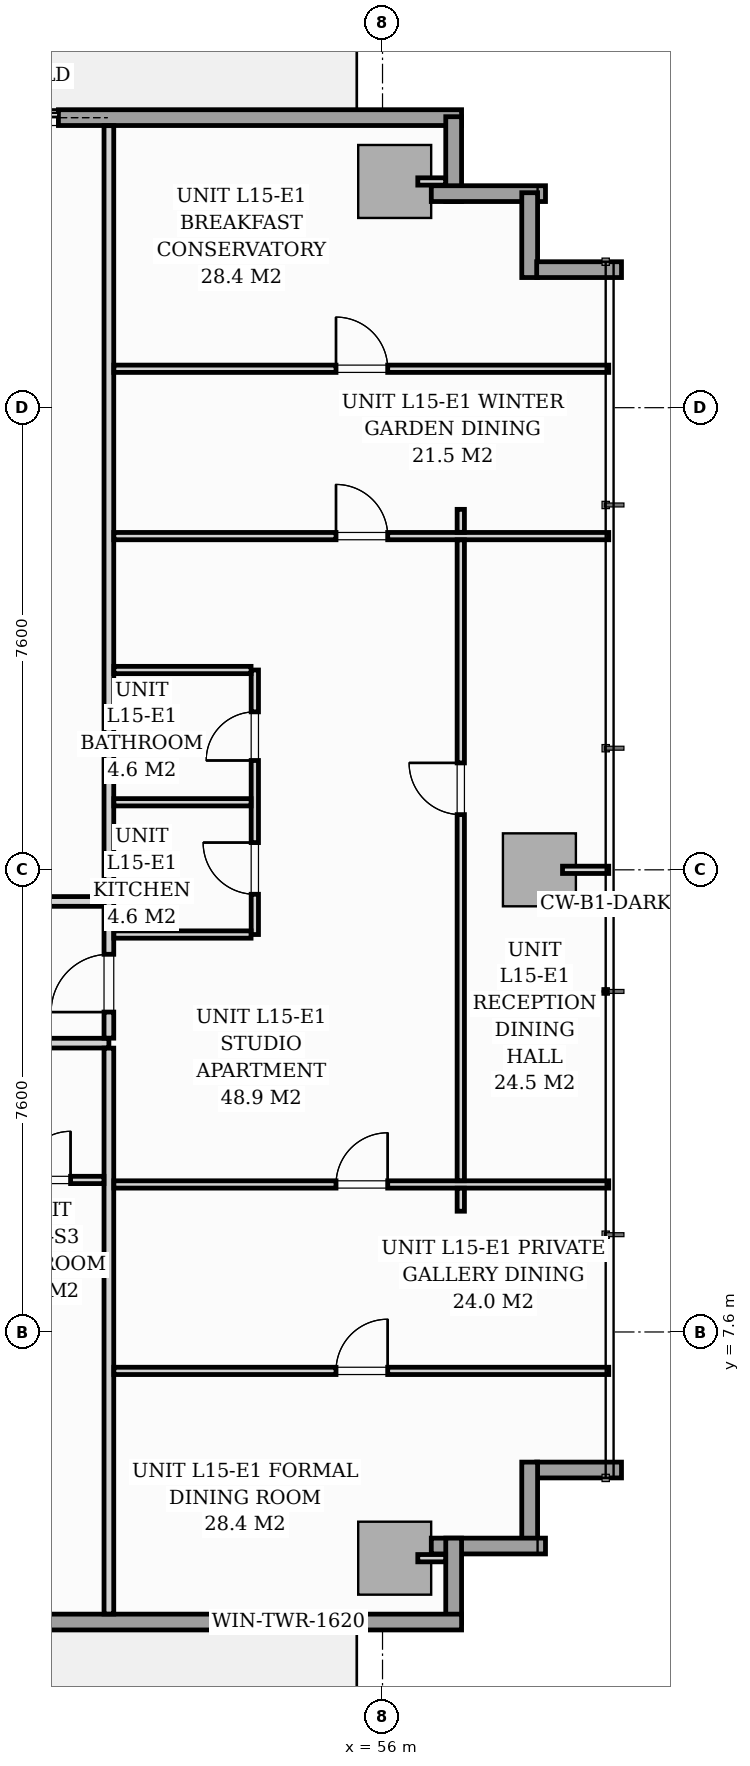
"""IFC4 building model, lengths in metres.
Left out: names, types, materials, properties, quantities, classifications, styles, units other than length and angle.
Written with IfcOpenShell. Run it as: python <this file> out.ifc"""

import sys

from ifc_helpers import new_model, si_unit, direction, frame, frame_2d, origin, origin_2d, place, context, subcontext, project, spatial, rectangle, extrude, source, transform, mapped, element, fill, save


model = new_model("IFC4")
c1 = context("Model", 3, precision=1e-05, world=origin(), true_north=direction((0.0, 1.0)))
c2 = subcontext(c1, "Body", "Model", "MODEL_VIEW")
j1 = project(units=[si_unit("LENGTHUNIT", "METRE"), si_unit("PLANEANGLEUNIT", "RADIAN")], contexts=[c1])
p1 = place(None, origin())
s1 = spatial("IfcSite", under=j1, at=p1, CompositionType="ELEMENT")
p2 = place(p1, origin())
s2 = spatial("IfcBuilding", under=s1, at=p2, CompositionType="ELEMENT")
p3 = place(p2, frame((0.0, 0.0, 55.0)))
s3 = spatial("IfcBuildingStorey", under=s2, at=p3, CompositionType="ELEMENT", Elevation=55.0)
m1 = source(origin(), c2, "Body", "SweptSolid", [
    extrude(rectangle(XDim=1.2, YDim=1.2, at=origin_2d()), origin(), (0.0, 0.0, 1.0), 3.196),
])
for number, where, z_axis, x_axis in (
    (1, (56.2, 3.88, 0.002), (0.0, 0.0, 1.0), (1.0, 0.0, 0.0)),
    (2, (56.2, 26.52, 0.002), (0.0, 0.0, 1.0), (1.0, 0.0, 0.0)),
    (3, (58.58, 15.2, 0.002), (0.0, 0.0, 1.0), (1.0, 0.0, 0.0)),
):
    element("IfcColumn", number, at=place(p3, frame(where, z_axis=z_axis, x_axis=x_axis)), inside=s3, PredefinedType="COLUMN", context=c2, shape_type="MappedRepresentation", body=[
        mapped(m1, transform((0.0, 0.0, 0.0), scale=1.0)),
    ])
p4 = place(p3, frame((40.15, 27.57, 0.0), z_axis=(0.0, 0.0, 1.0), x_axis=(1.0, 0.0, 0.0)))
e4 = element("IfcWall", 4, at=p4, inside=s3, PredefinedType="STANDARD", context=c2, shape_type="SweptSolid", body=[
    extrude(rectangle(XDim=17.15, YDim=0.26, at=frame_2d((8.575, 0.0))), origin(), (0.0, 0.0, 1.0), 2.94),
])
p5 = place(p4, frame((8.72, 0.0, 0.0)))
e5 = element("IfcOpeningElement", 5, at=p5, cuts=e4, PredefinedType="OPENING", context=c2, shape_type="SweptSolid", body=[
    extrude(rectangle(XDim=1.8, YDim=2.06, at=frame_2d((0.9, 1.03))), frame((0.0, 0.14, 0.0), z_axis=(0.0, -1.0, 0.0), x_axis=(1.0, 0.0, 0.0)), (0.0, 0.0, 1.0), 0.28),
])
p6 = place(p4, frame((0.7, 0.0, 0.65)))
e6 = element("IfcOpeningElement", 6, at=p6, cuts=e4, PredefinedType="OPENING", context=c2, shape_type="SweptSolid", body=[
    extrude(rectangle(XDim=1.6, YDim=1.5, at=frame_2d((0.8, 0.75))), frame((0.0, 0.14, 0.0), z_axis=(0.0, -1.0, 0.0), x_axis=(1.0, 0.0, 0.0)), (0.0, 0.0, 1.0), 0.28),
])
p7 = place(p3, frame((57.17, 27.585, 0.0), z_axis=(0.0, 0.0, 1.0), x_axis=(0.0, -1.0, 0.0)))
e7 = element("IfcWall", 7, at=p7, inside=s3, PredefinedType="STANDARD", context=c2, shape_type="SweptSolid", body=[
    extrude(rectangle(XDim=1.395, YDim=0.26, at=frame_2d((0.698, 0.0))), origin(), (0.0, 0.0, 1.0), 2.94),
])
p8 = place(p3, frame((56.802, 26.32, 0.0), z_axis=(0.0, 0.0, 1.0), x_axis=(1.0, 0.0, 0.0)))
e8 = element("IfcWall", 8, at=p8, inside=s3, PredefinedType="STANDARD", context=c2, shape_type="SweptSolid", body=[
    extrude(rectangle(XDim=1.878, YDim=0.26, at=frame_2d((0.939, 0.0))), origin(), (0.0, 0.0, 1.0), 2.94),
])
for number, where, z_axis, x_axis in (
    (9, (58.42, 26.335, 0.0), (0.0, 0.0, 1.0), (0.0, -1.0, 0.0)),
    (10, (58.535, 25.07, 0.0), (0.0, 0.0, 1.0), (1.0, 0.0, 0.0)),
    (11, (59.93, 5.33, 0.0), (0.0, 0.0, 1.0), (-1.0, 0.0, 0.0)),
    (12, (58.42, 5.46, 0.0), (0.0, 0.0, 1.0), (0.0, -1.0, 0.0)),
):
    element("IfcWall", number, at=place(p3, frame(where, z_axis=z_axis, x_axis=x_axis)), inside=s3, PredefinedType="STANDARD", context=c2, shape_type="SweptSolid", body=[
        extrude(rectangle(XDim=1.395, YDim=0.26, at=frame_2d((0.698, 0.0))), origin(), (0.0, 0.0, 1.0), 2.94),
    ])
p9 = place(p3, frame((58.68, 4.08, 0.0), z_axis=(0.0, 0.0, 1.0), x_axis=(-1.0, 0.0, 0.0)))
e13 = element("IfcWall", 13, at=p9, inside=s3, PredefinedType="STANDARD", context=c2, shape_type="SweptSolid", body=[
    extrude(rectangle(XDim=1.878, YDim=0.26, at=frame_2d((0.939, 0.0))), origin(), (0.0, 0.0, 1.0), 2.94),
])
p10 = place(p3, frame((57.17, 4.21, 0.0), z_axis=(0.0, 0.0, 1.0), x_axis=(0.0, -1.0, 0.0)))
e14 = element("IfcWall", 14, at=p10, inside=s3, PredefinedType="STANDARD", context=c2, shape_type="SweptSolid", body=[
    extrude(rectangle(XDim=1.395, YDim=0.26, at=frame_2d((0.698, 0.0))), origin(), (0.0, 0.0, 1.0), 2.94),
])
p11 = place(p3, frame((57.3, 2.83, 0.0), z_axis=(0.0, 0.0, 1.0), x_axis=(-1.0, 0.0, 0.0)))
e15 = element("IfcWall", 15, at=p11, inside=s3, PredefinedType="STANDARD", context=c2, shape_type="SweptSolid", body=[
    extrude(rectangle(XDim=17.15, YDim=0.26, at=frame_2d((8.575, 0.0))), origin(), (0.0, 0.0, 1.0), 2.94),
])
p12 = place(p11, frame((8.362, 0.0, 0.0)))
e16 = element("IfcOpeningElement", 16, at=p12, cuts=e15, PredefinedType="OPENING", context=c2, shape_type="SweptSolid", body=[
    extrude(rectangle(XDim=1.8, YDim=2.06, at=frame_2d((0.9, 1.03))), frame((0.0, 0.14, 0.0), z_axis=(0.0, -1.0, 0.0), x_axis=(1.0, 0.0, 0.0)), (0.0, 0.0, 1.0), 0.28),
])
p13 = place(p11, frame((2.05, 0.0, 0.65)))
e17 = element("IfcOpeningElement", 17, at=p13, cuts=e15, PredefinedType="OPENING", context=c2, shape_type="SweptSolid", body=[
    extrude(rectangle(XDim=1.6, YDim=1.5, at=frame_2d((0.8, 0.75))), frame((0.0, 0.14, 0.0), z_axis=(0.0, -1.0, 0.0), x_axis=(1.0, 0.0, 0.0)), (0.0, 0.0, 1.0), 0.28),
])
p14 = place(p3, frame((16.3, 12.35, 0.0), z_axis=(0.0, 0.0, 1.0), x_axis=(1.0, 0.0, 0.0)))
e18 = element("IfcWall", 18, at=p14, inside=s3, PredefinedType="PARTITIONING", context=c2, shape_type="SweptSolid", body=[
    extrude(rectangle(XDim=35.2, YDim=0.16, at=frame_2d((17.6, 0.0))), origin(), (0.0, 0.0, 1.0), 2.94),
])
p15 = place(p14, frame((6.307, 0.0, 0.0)))
e19 = element("IfcOpeningElement", 19, at=p15, cuts=e18, PredefinedType="OPENING", context=c2, shape_type="SweptSolid", body=[
    extrude(rectangle(XDim=0.95, YDim=2.06, at=frame_2d((0.475, 1.03))), frame((0.0, 0.09, 0.0), z_axis=(0.0, -1.0, 0.0), x_axis=(1.0, 0.0, 0.0)), (0.0, 0.0, 1.0), 0.18),
])
p16 = place(p14, frame((18.392, 0.0, 0.0)))
e20 = element("IfcOpeningElement", 20, at=p16, cuts=e18, PredefinedType="OPENING", context=c2, shape_type="SweptSolid", body=[
    extrude(rectangle(XDim=0.95, YDim=2.06, at=frame_2d((0.475, 1.03))), frame((0.0, 0.09, 0.0), z_axis=(0.0, -1.0, 0.0), x_axis=(1.0, 0.0, 0.0)), (0.0, 0.0, 1.0), 0.18),
])
p17 = place(p14, frame((29.304, 0.0, 0.0)))
e21 = element("IfcOpeningElement", 21, at=p17, cuts=e18, PredefinedType="OPENING", context=c2, shape_type="SweptSolid", body=[
    extrude(rectangle(XDim=0.95, YDim=2.06, at=frame_2d((0.475, 1.03))), frame((0.0, 0.09, 0.0), z_axis=(0.0, -1.0, 0.0), x_axis=(1.0, 0.0, 0.0)), (0.0, 0.0, 1.0), 0.18),
])
p18 = place(p3, frame((51.5, 2.962, 0.0), z_axis=(0.0, 0.0, 1.0), x_axis=(0.0, 1.0, 0.0)))
e22 = element("IfcWall", 22, at=p18, inside=s3, PredefinedType="PARTITIONING", context=c2, shape_type="SweptSolid", body=[
    extrude(rectangle(XDim=9.306, YDim=0.16, at=frame_2d((4.653, 0.0))), origin(), (0.0, 0.0, 1.0), 2.94),
])
p19 = place(p3, frame((51.5, 12.432, 0.0), z_axis=(0.0, 0.0, 1.0), x_axis=(0.0, 1.0, 0.0)))
e23 = element("IfcWall", 23, at=p19, inside=s3, PredefinedType="PARTITIONING", context=c2, shape_type="SweptSolid", body=[
    extrude(rectangle(XDim=15.006, YDim=0.16, at=frame_2d((7.503, 0.0))), origin(), (0.0, 0.0, 1.0), 2.94),
])
p20 = place(p19, frame((0.429, 0.0, 0.0)))
e24 = element("IfcOpeningElement", 24, at=p20, cuts=e23, PredefinedType="OPENING", context=c2, shape_type="SweptSolid", body=[
    extrude(rectangle(XDim=0.95, YDim=2.06, at=frame_2d((0.475, 1.03))), frame((0.0, 0.09, 0.0), z_axis=(0.0, -1.0, 0.0), x_axis=(1.0, 0.0, 0.0)), (0.0, 0.0, 1.0), 0.18),
])
p21 = place(p3, frame((47.32, 10.1, 0.0), z_axis=(0.0, 0.0, 1.0), x_axis=(1.0, 0.0, 0.0)))
e25 = element("IfcWall", 25, at=p21, inside=s3, PredefinedType="PARTITIONING", context=c2, shape_type="SweptSolid", body=[
    extrude(rectangle(XDim=4.098, YDim=0.12, at=frame_2d((2.049, 0.0))), origin(), (0.0, 0.0, 1.0), 2.94),
])
p22 = place(p21, frame((0.675, 0.0, 0.0)))
e26 = element("IfcOpeningElement", 26, at=p22, cuts=e25, PredefinedType="OPENING", context=c2, shape_type="SweptSolid", body=[
    extrude(rectangle(XDim=0.85, YDim=2.05, at=frame_2d((0.425, 1.025))), frame((0.0, 0.07, 0.0), z_axis=(0.0, -1.0, 0.0), x_axis=(1.0, 0.0, 0.0)), (0.0, 0.0, 1.0), 0.14),
])
p23 = place(p21, frame((2.75, 0.0, 0.0)))
e27 = element("IfcOpeningElement", 27, at=p23, cuts=e25, PredefinedType="OPENING", context=c2, shape_type="SweptSolid", body=[
    extrude(rectangle(XDim=0.8, YDim=2.02, at=frame_2d((0.4, 1.01))), frame((0.0, 0.07, 0.0), z_axis=(0.0, -1.0, 0.0), x_axis=(1.0, 0.0, 0.0)), (0.0, 0.0, 1.0), 0.14),
])
p24 = place(p3, frame((53.9, 14.136, 0.0), z_axis=(0.0, 0.0, 1.0), x_axis=(0.0, 1.0, 0.0)))
e28 = element("IfcWall", 28, at=p24, inside=s3, PredefinedType="PARTITIONING", context=c2, shape_type="SweptSolid", body=[
    extrude(rectangle(XDim=4.35, YDim=0.12, at=frame_2d((2.175, 0.0))), origin(), (0.0, 0.0, 1.0), 2.94),
])
p25 = place(p24, frame((0.662, 0.0, 0.0)))
e29 = element("IfcOpeningElement", 29, at=p25, cuts=e28, PredefinedType="OPENING", context=c2, shape_type="SweptSolid", body=[
    extrude(rectangle(XDim=0.85, YDim=2.05, at=frame_2d((0.425, 1.025))), frame((0.0, 0.07, 0.0), z_axis=(0.0, -1.0, 0.0), x_axis=(1.0, 0.0, 0.0)), (0.0, 0.0, 1.0), 0.14),
])
p26 = place(p24, frame((2.862, 0.0, 0.0)))
e30 = element("IfcOpeningElement", 30, at=p26, cuts=e28, PredefinedType="OPENING", context=c2, shape_type="SweptSolid", body=[
    extrude(rectangle(XDim=0.8, YDim=2.02, at=frame_2d((0.4, 1.01))), frame((0.0, 0.07, 0.0), z_axis=(0.0, -1.0, 0.0), x_axis=(1.0, 0.0, 0.0)), (0.0, 0.0, 1.0), 0.14),
])
p27 = place(p3, frame((51.582, 16.311, 0.0), z_axis=(0.0, 0.0, 1.0), x_axis=(1.0, 0.0, 0.0)))
e31 = element("IfcWall", 31, at=p27, inside=s3, PredefinedType="PARTITIONING", context=c2, shape_type="SweptSolid", body=[
    extrude(rectangle(XDim=2.256, YDim=0.12, at=frame_2d((1.128, 0.0))), origin(), (0.0, 0.0, 1.0), 2.045),
])
for number, where, z_axis, x_axis in (
    (32, (51.582, 14.136, 0.0), (0.0, 0.0, 1.0), (1.0, 0.0, 0.0)),
    (33, (51.582, 18.486, 0.0), (0.0, 0.0, 1.0), (1.0, 0.0, 0.0)),
):
    element("IfcWall", number, at=place(p3, frame(where, z_axis=z_axis, x_axis=x_axis)), inside=s3, PredefinedType="PARTITIONING", context=c2, shape_type="SweptSolid", body=[
        extrude(rectangle(XDim=2.256, YDim=0.12, at=frame_2d((1.128, 0.0))), origin(), (0.0, 0.0, 1.0), 2.94),
    ])
p28 = place(p3, frame((51.582, 6.96, 0.0), z_axis=(0.0, 0.0, 1.0), x_axis=(1.0, 0.0, 0.0)))
e34 = element("IfcWall", 34, at=p28, inside=s3, PredefinedType="PARTITIONING", context=c2, shape_type="SweptSolid", body=[
    extrude(rectangle(XDim=8.138, YDim=0.12, at=frame_2d((4.069, 0.0))), origin(), (0.0, 0.0, 1.0), 2.94),
])
p29 = place(p28, frame((3.653, 0.0, 0.0)))
e35 = element("IfcOpeningElement", 35, at=p29, cuts=e34, PredefinedType="OPENING", context=c2, shape_type="SweptSolid", body=[
    extrude(rectangle(XDim=0.85, YDim=2.05, at=frame_2d((0.425, 1.025))), frame((0.0, 0.07, 0.0), z_axis=(0.0, -1.0, 0.0), x_axis=(1.0, 0.0, 0.0)), (0.0, 0.0, 1.0), 0.14),
])
p30 = place(p3, frame((51.582, 23.44, 0.0), z_axis=(0.0, 0.0, 1.0), x_axis=(1.0, 0.0, 0.0)))
e36 = element("IfcWall", 36, at=p30, inside=s3, PredefinedType="PARTITIONING", context=c2, shape_type="SweptSolid", body=[
    extrude(rectangle(XDim=8.138, YDim=0.12, at=frame_2d((4.069, 0.0))), origin(), (0.0, 0.0, 1.0), 2.94),
])
p31 = place(p30, frame((3.653, 0.0, 0.0)))
e37 = element("IfcOpeningElement", 37, at=p31, cuts=e36, PredefinedType="OPENING", context=c2, shape_type="SweptSolid", body=[
    extrude(rectangle(XDim=0.85, YDim=2.05, at=frame_2d((0.425, 1.025))), frame((0.0, 0.07, 0.0), z_axis=(0.0, -1.0, 0.0), x_axis=(1.0, 0.0, 0.0)), (0.0, 0.0, 1.0), 0.14),
])
p32 = place(p3, frame((51.582, 10.026, 0.0), z_axis=(0.0, 0.0, 1.0), x_axis=(1.0, 0.0, 0.0)))
e38 = element("IfcWall", 38, at=p32, inside=s3, PredefinedType="PARTITIONING", context=c2, shape_type="SweptSolid", body=[
    extrude(rectangle(XDim=8.138, YDim=0.12, at=frame_2d((4.069, 0.0))), origin(), (0.0, 0.0, 1.0), 2.94),
])
p33 = place(p32, frame((3.653, 0.0, 0.0)))
e39 = element("IfcOpeningElement", 39, at=p33, cuts=e38, PredefinedType="OPENING", context=c2, shape_type="SweptSolid", body=[
    extrude(rectangle(XDim=0.85, YDim=2.05, at=frame_2d((0.425, 1.025))), frame((0.0, 0.07, 0.0), z_axis=(0.0, -1.0, 0.0), x_axis=(1.0, 0.0, 0.0)), (0.0, 0.0, 1.0), 0.14),
])
p34 = place(p3, frame((51.582, 20.688, 0.0), z_axis=(0.0, 0.0, 1.0), x_axis=(1.0, 0.0, 0.0)))
e40 = element("IfcWall", 40, at=p34, inside=s3, PredefinedType="PARTITIONING", context=c2, shape_type="SweptSolid", body=[
    extrude(rectangle(XDim=8.138, YDim=0.12, at=frame_2d((4.069, 0.0))), origin(), (0.0, 0.0, 1.0), 2.94),
])
p35 = place(p34, frame((3.653, 0.0, 0.0)))
e41 = element("IfcOpeningElement", 41, at=p35, cuts=e40, PredefinedType="OPENING", context=c2, shape_type="SweptSolid", body=[
    extrude(rectangle(XDim=0.85, YDim=2.05, at=frame_2d((0.425, 1.025))), frame((0.0, 0.07, 0.0), z_axis=(0.0, -1.0, 0.0), x_axis=(1.0, 0.0, 0.0)), (0.0, 0.0, 1.0), 0.14),
])
p36 = place(p3, frame((57.287, 9.586, 0.0), z_axis=(0.0, 0.0, 1.0), x_axis=(0.0, 1.0, 0.0)))
e42 = element("IfcWall", 42, at=p36, inside=s3, PredefinedType="PARTITIONING", context=c2, shape_type="SweptSolid", body=[
    extrude(rectangle(XDim=0.378, YDim=0.12, at=frame_2d((0.189, 0.0))), origin(), (0.0, 0.0, 1.0), 2.94),
])
p37 = place(p3, frame((57.287, 10.088, 0.0), z_axis=(0.0, 0.0, 1.0), x_axis=(0.0, 1.0, 0.0)))
e43 = element("IfcWall", 43, at=p37, inside=s3, PredefinedType="PARTITIONING", context=c2, shape_type="SweptSolid", body=[
    extrude(rectangle(XDim=10.538, YDim=0.12, at=frame_2d((5.269, 0.0))), origin(), (0.0, 0.0, 1.0), 2.94),
])
p38 = place(p37, frame((6.02, 0.0, 0.0)))
e44 = element("IfcOpeningElement", 44, at=p38, cuts=e43, PredefinedType="OPENING", context=c2, shape_type="SweptSolid", body=[
    extrude(rectangle(XDim=0.85, YDim=2.05, at=frame_2d((0.425, 1.025))), frame((0.0, 0.07, 0.0), z_axis=(0.0, -1.0, 0.0), x_axis=(1.0, 0.0, 0.0)), (0.0, 0.0, 1.0), 0.14),
])
p39 = place(p3, frame((57.287, 20.75, 0.0), z_axis=(0.0, 0.0, 1.0), x_axis=(0.0, 1.0, 0.0)))
e45 = element("IfcWall", 45, at=p39, inside=s3, PredefinedType="PARTITIONING", context=c2, shape_type="SweptSolid", body=[
    extrude(rectangle(XDim=0.378, YDim=0.12, at=frame_2d((0.189, 0.0))), origin(), (0.0, 0.0, 1.0), 2.31),
])
p40 = place(p3, frame((45.84, 14.68, 0.0), z_axis=(0.0, 0.0, 1.0), x_axis=(1.0, 0.0, 0.0)))
e46 = element("IfcWall", 46, at=p40, inside=s3, PredefinedType="PARTITIONING", context=c2, shape_type="SweptSolid", body=[
    extrude(rectangle(XDim=5.578, YDim=0.16, at=frame_2d((2.789, 0.0))), origin(), (0.0, 0.0, 1.0), 2.94),
])
p41 = place(p40, frame((2.415, 0.0, 0.0)))
e47 = element("IfcOpeningElement", 47, at=p41, cuts=e46, PredefinedType="OPENING", context=c2, shape_type="SweptSolid", body=[
    extrude(rectangle(XDim=0.95, YDim=2.06, at=frame_2d((0.475, 1.03))), frame((0.0, 0.09, 0.0), z_axis=(0.0, -1.0, 0.0), x_axis=(1.0, 0.0, 0.0)), (0.0, 0.0, 1.0), 0.18),
])
for number, where, z_axis, x_axis in (
    (48, (56.58, 3.88, 0.0), (0.0, 0.0, 1.0), (1.0, 0.0, 0.0)),
    (49, (56.58, 26.52, 0.0), (0.0, 0.0, 1.0), (1.0, 0.0, 0.0)),
):
    element("IfcWall", number, at=place(p3, frame(where, z_axis=z_axis, x_axis=x_axis)), inside=s3, PredefinedType="PARTITIONING", context=c2, shape_type="SweptSolid", body=[
        extrude(rectangle(XDim=0.458, YDim=0.12, at=frame_2d((0.229, 0.0))), origin(), (0.0, 0.0, 1.0), 2.94),
    ])
p42 = place(p3, frame((58.96, 15.2, 0.0), z_axis=(0.0, 0.0, 1.0), x_axis=(1.0, 0.0, 0.0)))
e50 = element("IfcWall", 50, at=p42, inside=s3, PredefinedType="PARTITIONING", context=c2, shape_type="SweptSolid", body=[
    extrude(rectangle(XDim=0.76, YDim=0.12, at=frame_2d((0.38, 0.0))), origin(), (0.0, 0.0, 1.0), 2.94),
])
m2 = source(origin(), c2, "Body", "SweptSolid", [
    extrude(rectangle(XDim=1.8, YDim=2.06, at=frame_2d((0.9, 1.03))), frame((0.0, 0.025, 0.0), z_axis=(0.0, -1.0, 0.0), x_axis=(1.0, 0.0, 0.0)), (0.0, 0.0, 1.0), 0.05),
])
p43 = place(p5, origin())
e51 = element("IfcDoor", 51, at=p43, inside=s3, OperationType="SLIDING_TO_RIGHT", PredefinedType="DOOR", context=c2, shape_type="MappedRepresentation", body=[
    mapped(m2, transform((0.0, 0.0, 0.0), scale=1.0)),
])
fill(e5, e51)
m3 = source(origin(), c2, "Body", "SweptSolid", [
    extrude(rectangle(XDim=1.6, YDim=1.5, at=frame_2d((0.8, 0.75))), frame((0.0, 0.03, 0.0), z_axis=(0.0, -1.0, 0.0), x_axis=(1.0, 0.0, 0.0)), (0.0, 0.0, 1.0), 0.06),
])
p44 = place(p13, origin())
e52 = element("IfcWindow", 52, at=p44, inside=s3, PartitioningType="SINGLE_PANEL", PredefinedType="WINDOW", context=c2, shape_type="MappedRepresentation", body=[
    mapped(m3, transform((0.0, 0.0, 0.0), scale=1.0)),
])
fill(e17, e52)
m4 = source(origin(), c2, "Body", "SweptSolid", [
    extrude(rectangle(XDim=0.8, YDim=2.02, at=frame_2d((0.4, 1.01))), frame((0.0, 0.025, 0.0), z_axis=(0.0, -1.0, 0.0), x_axis=(1.0, 0.0, 0.0)), (0.0, 0.0, 1.0), 0.05),
])
p45 = place(p23, origin())
e53 = element("IfcDoor", 53, at=p45, inside=s3, OperationType="SINGLE_SWING_RIGHT", PredefinedType="DOOR", context=c2, shape_type="MappedRepresentation", body=[
    mapped(m4, transform((0.0, 0.0, 0.0), scale=1.0)),
])
fill(e27, e53)
m5 = source(origin(), c2, "Body", "SweptSolid", [
    extrude(rectangle(XDim=0.95, YDim=2.06, at=frame_2d((0.475, 1.03))), frame((0.0, 0.025, 0.0), z_axis=(0.0, -1.0, 0.0), x_axis=(1.0, 0.0, 0.0)), (0.0, 0.0, 1.0), 0.05),
])
p46 = place(p20, origin())
e54 = element("IfcDoor", 54, at=p46, inside=s3, OperationType="SINGLE_SWING_LEFT", PredefinedType="DOOR", context=c2, shape_type="MappedRepresentation", body=[
    mapped(m5, transform((0.0, 0.0, 0.0), scale=1.0)),
])
fill(e24, e54)
m6 = source(origin(), c2, "Body", "SweptSolid", [
    extrude(rectangle(XDim=0.85, YDim=2.05, at=frame_2d((0.425, 1.025))), frame((0.0, 0.025, 0.0), z_axis=(0.0, -1.0, 0.0), x_axis=(1.0, 0.0, 0.0)), (0.0, 0.0, 1.0), 0.05),
])
p47 = place(p25, origin())
e55 = element("IfcDoor", 55, at=p47, inside=s3, OperationType="SINGLE_SWING_RIGHT", PredefinedType="DOOR", context=c2, shape_type="MappedRepresentation", body=[
    mapped(m6, transform((0.0, 0.0, 0.0), scale=1.0)),
])
fill(e29, e55)
p48 = place(p26, origin())
e56 = element("IfcDoor", 56, at=p48, inside=s3, OperationType="SINGLE_SWING_LEFT", PredefinedType="DOOR", context=c2, shape_type="MappedRepresentation", body=[
    mapped(m4, transform((0.0, 0.0, 0.0), scale=1.0)),
])
fill(e30, e56)
p49 = place(p29, origin())
e57 = element("IfcDoor", 57, at=p49, inside=s3, OperationType="SINGLE_SWING_RIGHT", PredefinedType="DOOR", context=c2, shape_type="MappedRepresentation", body=[
    mapped(m6, transform((0.0, 0.0, 0.0), scale=1.0)),
])
fill(e35, e57)
p50 = place(p31, origin())
e58 = element("IfcDoor", 58, at=p50, inside=s3, OperationType="SINGLE_SWING_LEFT", PredefinedType="DOOR", context=c2, shape_type="MappedRepresentation", body=[
    mapped(m6, transform((0.0, 0.0, 0.0), scale=1.0)),
])
fill(e37, e58)
p51 = place(p33, origin())
e59 = element("IfcDoor", 59, at=p51, inside=s3, OperationType="SINGLE_SWING_RIGHT", PredefinedType="DOOR", context=c2, shape_type="MappedRepresentation", body=[
    mapped(m6, transform((0.0, 0.0, 0.0), scale=1.0)),
])
fill(e39, e59)
p52 = place(p35, origin())
e60 = element("IfcDoor", 60, at=p52, inside=s3, OperationType="SINGLE_SWING_LEFT", PredefinedType="DOOR", context=c2, shape_type="MappedRepresentation", body=[
    mapped(m6, transform((0.0, 0.0, 0.0), scale=1.0)),
])
fill(e41, e60)
p53 = place(p38, origin())
e61 = element("IfcDoor", 61, at=p53, inside=s3, OperationType="SINGLE_SWING_RIGHT", PredefinedType="DOOR", context=c2, shape_type="MappedRepresentation", body=[
    mapped(m6, transform((0.0, 0.0, 0.0), scale=1.0)),
])
fill(e44, e61)
save(model, sys.argv[1])
